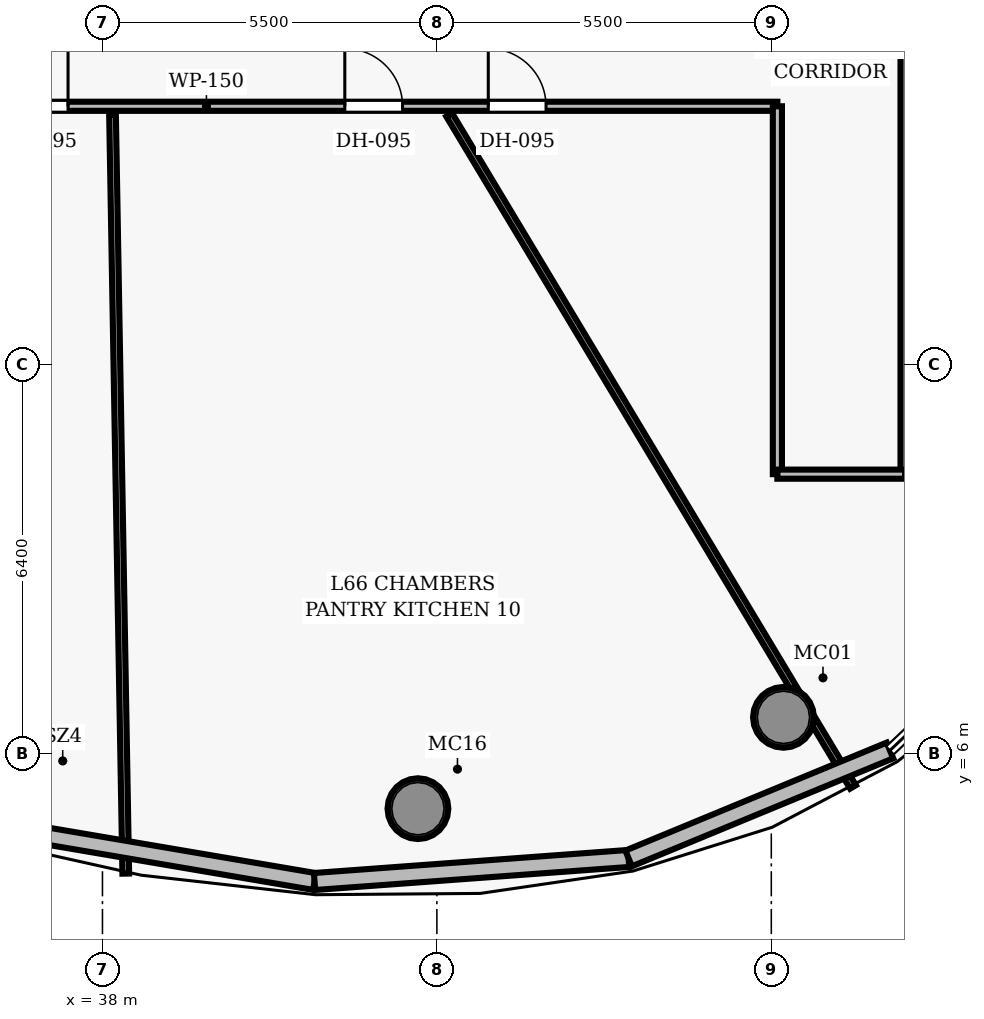
"""IFC4 building model, lengths in metres.
Left out: names, types, materials, properties, quantities, classifications, styles, units other than length and angle.
Written with IfcOpenShell. Run it as: python <this file> out.ifc"""

import sys

from ifc_helpers import new_model, si_unit, direction, frame, frame_2d, origin, origin_2d, place, context, subcontext, project, spatial, rectangle, hollow_circle, extrude, element, fill, save


model = new_model("IFC4")
c1 = context("Model", 3, precision=1e-05, world=origin(), true_north=direction((0.0, 1.0)))
c2 = subcontext(c1, "Body", "Model", "MODEL_VIEW")
j1 = project(units=[si_unit("LENGTHUNIT", "METRE"), si_unit("PLANEANGLEUNIT", "RADIAN")], contexts=[c1])
p1 = place(None, origin())
s1 = spatial("IfcSite", under=j1, at=p1, CompositionType="ELEMENT")
p2 = place(p1, origin())
s2 = spatial("IfcBuilding", under=s1, at=p2, CompositionType="ELEMENT")
p3 = place(p2, frame((0.0, 0.0, 261.3)))
s3 = spatial("IfcBuildingStorey", under=s2, at=p3, CompositionType="ELEMENT", Elevation=261.3)
for number, where, z_axis, x_axis in (
    (1, (49.2, 6.601, 0.0), (0.0, 0.0, 1.0), (1.0, 0.0, 0.0)),
    (2, (43.188, 5.099, 0.0), (0.0, 0.0, 1.0), (1.0, 0.0, 0.0)),
):
    element("IfcColumn", number, at=place(p3, frame(where, z_axis=z_axis, x_axis=x_axis)), inside=s3, PredefinedType="COLUMN", context=c2, shape_type="SweptSolid", body=[
        extrude(hollow_circle(Radius=0.5, WallThickness=0.045, at=origin_2d()), origin(), (0.0, 0.0, 1.0), 3.85),
    ])
p4 = place(p3, frame((26.9, 16.65, 0.0), z_axis=(0.0, 0.0, 1.0), x_axis=(1.0, 0.0, 0.0)))
e3 = element("IfcWall", 3, at=p4, inside=s3, PredefinedType="PARTITIONING", context=c2, shape_type="SweptSolid", body=[
    extrude(rectangle(XDim=22.2, YDim=0.15, at=frame_2d((11.1, 0.0))), origin(), (0.0, 0.0, 1.0), 3.04),
])
p5 = place(p4, frame((4.135, 0.0, 0.0)))
e4 = element("IfcOpeningElement", 4, at=p5, cuts=e3, PredefinedType="OPENING", context=c2, shape_type="SweptSolid", body=[
    extrude(rectangle(XDim=0.95, YDim=2.15, at=frame_2d((0.475, 1.075))), frame((0.0, 0.085, 0.0), z_axis=(0.0, -1.0, 0.0), x_axis=(1.0, 0.0, 0.0)), (0.0, 0.0, 1.0), 0.17),
])
p6 = place(p4, frame((9.584, 0.0, 0.0)))
e5 = element("IfcOpeningElement", 5, at=p6, cuts=e3, PredefinedType="OPENING", context=c2, shape_type="SweptSolid", body=[
    extrude(rectangle(XDim=0.95, YDim=2.15, at=frame_2d((0.475, 1.075))), frame((0.0, 0.085, 0.0), z_axis=(0.0, -1.0, 0.0), x_axis=(1.0, 0.0, 0.0)), (0.0, 0.0, 1.0), 0.17),
])
p7 = place(p4, frame((15.086, 0.0, 0.0)))
e6 = element("IfcOpeningElement", 6, at=p7, cuts=e3, PredefinedType="OPENING", context=c2, shape_type="SweptSolid", body=[
    extrude(rectangle(XDim=0.95, YDim=2.15, at=frame_2d((0.475, 1.075))), frame((0.0, 0.085, 0.0), z_axis=(0.0, -1.0, 0.0), x_axis=(1.0, 0.0, 0.0)), (0.0, 0.0, 1.0), 0.17),
])
p8 = place(p4, frame((17.445, 0.0, 0.0)))
e7 = element("IfcOpeningElement", 7, at=p8, cuts=e3, PredefinedType="OPENING", context=c2, shape_type="SweptSolid", body=[
    extrude(rectangle(XDim=0.95, YDim=2.15, at=frame_2d((0.475, 1.075))), frame((0.0, 0.085, 0.0), z_axis=(0.0, -1.0, 0.0), x_axis=(1.0, 0.0, 0.0)), (0.0, 0.0, 1.0), 0.17),
])
p9 = place(p3, frame((51.2, 10.6, 0.0), z_axis=(0.0, 0.0, 1.0), x_axis=(0.0, 1.0, 0.0)))
e8 = element("IfcWall", 8, at=p9, inside=s3, PredefinedType="PARTITIONING", context=c2, shape_type="SweptSolid", body=[
    extrude(rectangle(XDim=30.8, YDim=0.15, at=frame_2d((15.4, 0.0))), origin(), (0.0, 0.0, 1.0), 3.04),
])
p10 = place(p9, frame((17.79, 0.0, 0.0)))
e9 = element("IfcOpeningElement", 9, at=p10, cuts=e8, PredefinedType="OPENING", context=c2, shape_type="SweptSolid", body=[
    extrude(rectangle(XDim=0.95, YDim=2.15, at=frame_2d((0.475, 1.075))), frame((0.0, 0.085, 0.0), z_axis=(0.0, -1.0, 0.0), x_axis=(1.0, 0.0, 0.0)), (0.0, 0.0, 1.0), 0.17),
])
p11 = place(p9, frame((13.401, 0.0, 0.0)))
e10 = element("IfcOpeningElement", 10, at=p11, cuts=e8, PredefinedType="OPENING", context=c2, shape_type="SweptSolid", body=[
    extrude(rectangle(XDim=0.95, YDim=2.15, at=frame_2d((0.475, 1.075))), frame((0.0, 0.085, 0.0), z_axis=(0.0, -1.0, 0.0), x_axis=(1.0, 0.0, 0.0)), (0.0, 0.0, 1.0), 0.17),
])
p12 = place(p3, frame((49.1, 10.6, 0.0), z_axis=(0.0, 0.0, 1.0), x_axis=(0.0, 1.0, 0.0)))
e11 = element("IfcWall", 11, at=p12, inside=s3, PredefinedType="PARTITIONING", context=c2, shape_type="SweptSolid", body=[
    extrude(rectangle(XDim=6.05, YDim=0.15, at=frame_2d((3.025, 0.0))), origin(), (0.0, 0.0, 1.0), 3.04),
])
p13 = place(p3, frame((49.1, 10.6, 0.0), z_axis=(0.0, 0.0, 1.0), x_axis=(1.0, 0.0, 0.0)))
e12 = element("IfcWall", 12, at=p13, inside=s3, PredefinedType="PARTITIONING", context=c2, shape_type="SweptSolid", body=[
    extrude(rectangle(XDim=2.1, YDim=0.15, at=frame_2d((1.05, 0.0))), origin(), (0.0, 0.0, 1.0), 3.04),
])
p14 = place(p3, frame((38.166, 16.51, 0.0), z_axis=(0.0, 0.0, 1.0), x_axis=(0.017468427639, -0.999847415377, 0.0)))
e13 = element("IfcWall", 13, at=p14, inside=s3, PredefinedType="PARTITIONING", context=c2, shape_type="SweptSolid", body=[
    extrude(rectangle(XDim=12.481, YDim=0.11, at=frame_2d((6.24, 0.0))), origin(), (0.0, 0.0, 1.0), 3.04),
])
p15 = place(p3, frame((43.702, 16.51, 0.0), z_axis=(0.0, 0.0, 1.0), x_axis=(0.515038568359, -0.857167004208, 0.0)))
e14 = element("IfcWall", 14, at=p15, inside=s3, PredefinedType="PARTITIONING", context=c2, shape_type="SweptSolid", body=[
    extrude(rectangle(XDim=12.895, YDim=0.11, at=frame_2d((6.448, 0.0))), origin(), (0.0, 0.0, 1.0), 3.04),
])
p16 = place(p3, frame((41.488, 3.901, 0.0), z_axis=(0.0, 0.0, 1.0), x_axis=(-0.985868784633, 0.167519370479, 0.0)))
e15 = element("IfcWall", 15, at=p16, inside=s3, PredefinedType="SOLIDWALL", context=c2, shape_type="SweptSolid", body=[
    extrude(rectangle(XDim=5.86, YDim=0.28, at=frame_2d((2.93, 0.0))), origin(), (0.0, 0.0, 1.0), 3.625),
])
p17 = place(p3, frame((46.654, 4.28, 0.0), z_axis=(0.0, 0.0, 1.0), x_axis=(-0.99732023432, -0.073159758173, 0.0)))
e16 = element("IfcWall", 16, at=p17, inside=s3, PredefinedType="SOLIDWALL", context=c2, shape_type="SweptSolid", body=[
    extrude(rectangle(XDim=5.179, YDim=0.28, at=frame_2d((2.59, 0.0))), origin(), (0.0, 0.0, 1.0), 3.625),
])
p18 = place(p3, frame((50.951, 6.056, 0.0), z_axis=(0.0, 0.0, 1.0), x_axis=(-0.924191341686, -0.381929789296, 0.0)))
e17 = element("IfcWall", 17, at=p18, inside=s3, PredefinedType="SOLIDWALL", context=c2, shape_type="SweptSolid", body=[
    extrude(rectangle(XDim=4.65, YDim=0.28, at=frame_2d((2.325, 0.0))), origin(), (0.0, 0.0, 1.0), 3.625),
])
p19 = place(p6, origin())
e18 = element("IfcDoor", 18, at=p19, inside=s3, OperationType="SINGLE_SWING_RIGHT", PredefinedType="DOOR", context=c2, shape_type="SweptSolid", body=[
    extrude(rectangle(XDim=0.95, YDim=2.15, at=frame_2d((0.475, 1.075))), frame((0.0, 0.025, 0.0), z_axis=(0.0, -1.0, 0.0), x_axis=(1.0, 0.0, 0.0)), (0.0, 0.0, 1.0), 0.05),
])
fill(e5, e18)
p20 = place(p7, origin())
e19 = element("IfcDoor", 19, at=p20, inside=s3, OperationType="SINGLE_SWING_LEFT", PredefinedType="DOOR", context=c2, shape_type="SweptSolid", body=[
    extrude(rectangle(XDim=0.95, YDim=2.15, at=frame_2d((0.475, 1.075))), frame((0.0, 0.025, 0.0), z_axis=(0.0, -1.0, 0.0), x_axis=(1.0, 0.0, 0.0)), (0.0, 0.0, 1.0), 0.05),
])
fill(e6, e19)
p21 = place(p8, origin())
e20 = element("IfcDoor", 20, at=p21, inside=s3, OperationType="SINGLE_SWING_LEFT", PredefinedType="DOOR", context=c2, shape_type="SweptSolid", body=[
    extrude(rectangle(XDim=0.95, YDim=2.15, at=frame_2d((0.475, 1.075))), frame((0.0, 0.025, 0.0), z_axis=(0.0, -1.0, 0.0), x_axis=(1.0, 0.0, 0.0)), (0.0, 0.0, 1.0), 0.05),
])
fill(e7, e20)
save(model, sys.argv[1])
